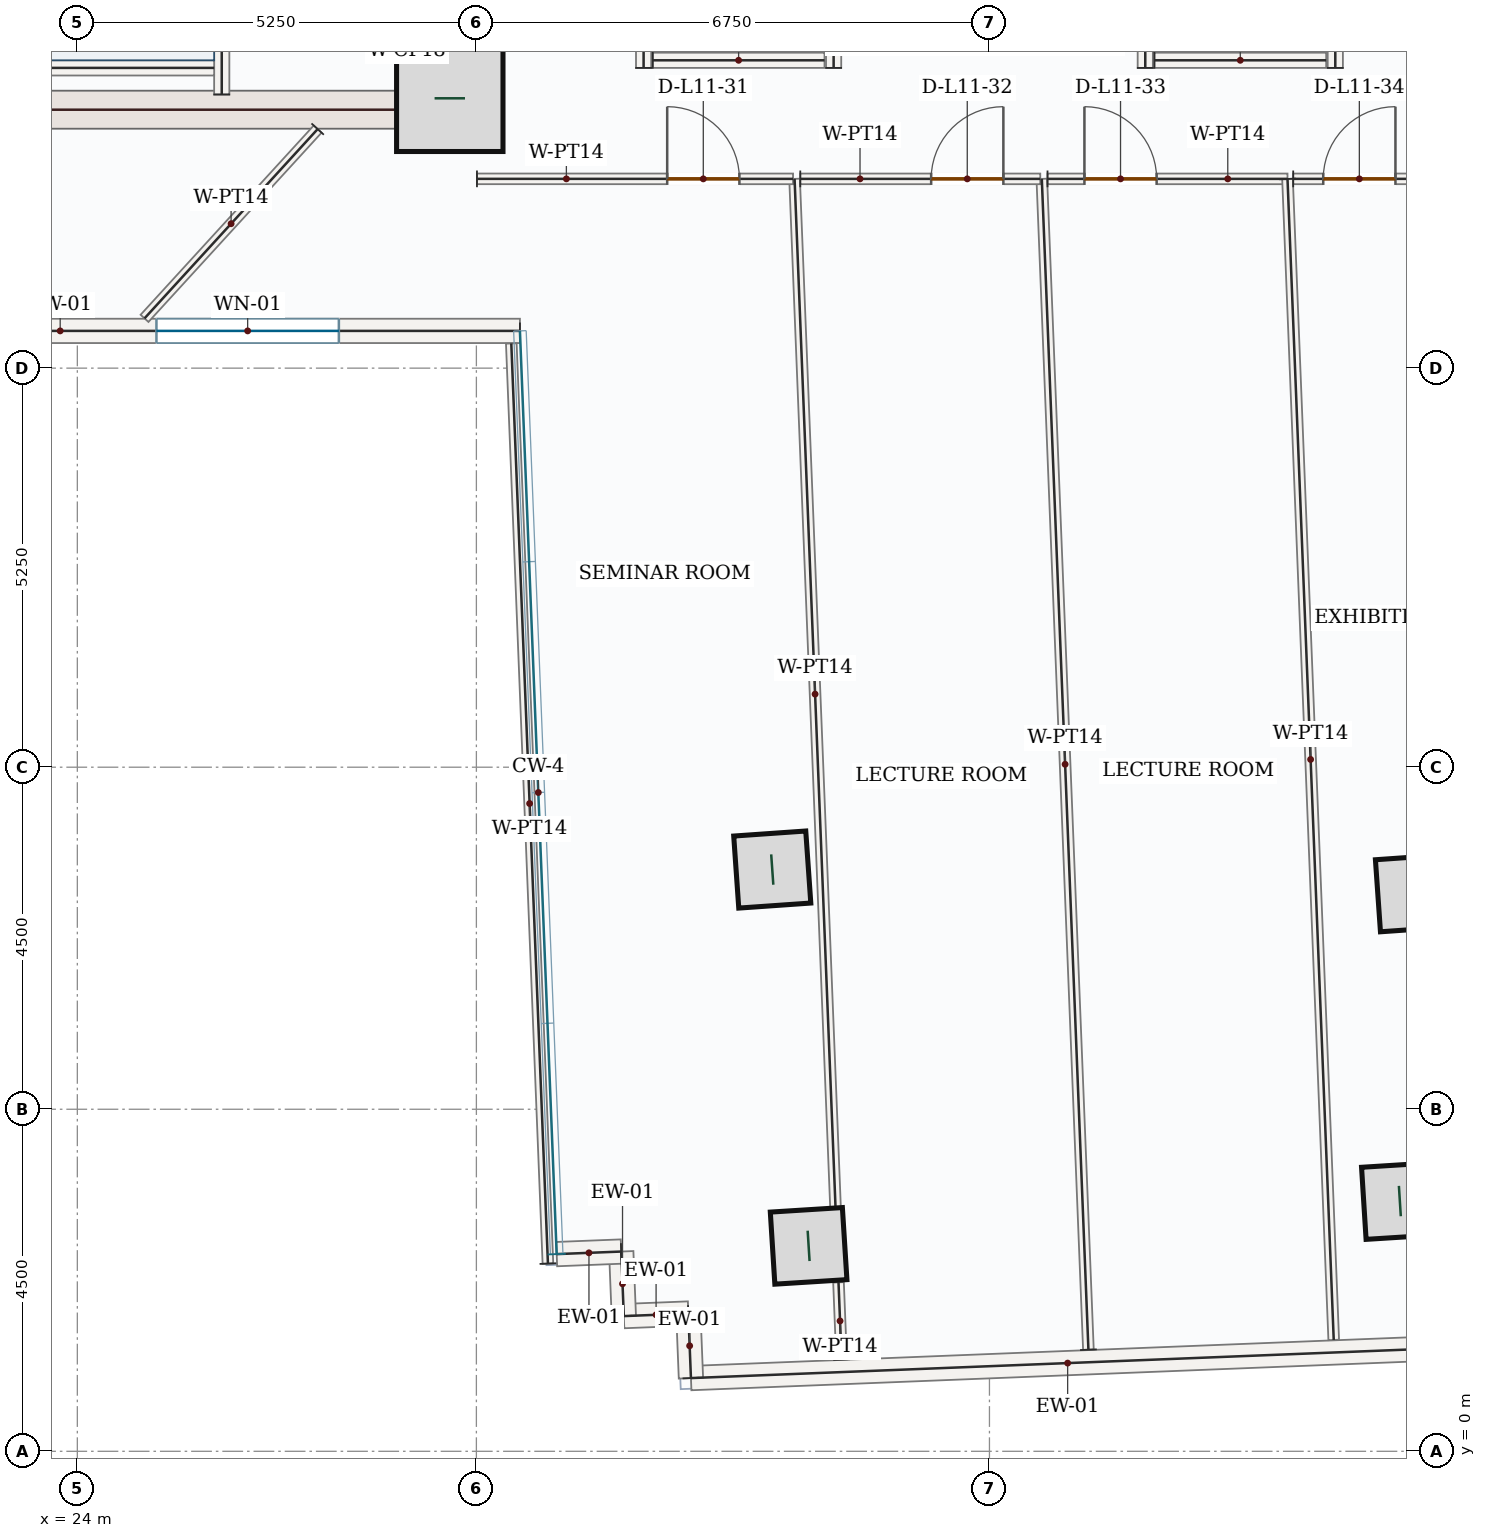
"""IFC4 building model, lengths in metres.
Left out: names, types, materials, properties, quantities, classifications, styles, units other than length and angle.
Written with IfcOpenShell. Run it as: python <this file> out.ifc"""

import sys

from ifc_helpers import new_model, si_unit, direction, frame, frame_2d, origin, origin_2d, place, context, subcontext, project, spatial, rectangle, hollow_rectangle, extrude, source, transform, mapped, element, fill, save


model = new_model("IFC4")
c1 = context("Model", 3, precision=1e-05, world=origin(), true_north=direction((0.0, 1.0)))
c2 = subcontext(c1, "Body", "Model", "MODEL_VIEW")
j1 = project(units=[si_unit("LENGTHUNIT", "METRE"), si_unit("PLANEANGLEUNIT", "RADIAN")], contexts=[c1])
p1 = place(None, origin())
s1 = spatial("IfcSite", under=j1, at=p1, CompositionType="ELEMENT")
p2 = place(p1, origin())
s2 = spatial("IfcBuilding", under=s1, at=p2, CompositionType="ELEMENT")
p3 = place(p2, frame((0.0, 0.0, 54.3)))
s3 = spatial("IfcBuildingStorey", under=s2, at=p3, CompositionType="ELEMENT", Elevation=54.3)
p4 = place(p3, frame((29.0, 17.4, 0.0), z_axis=(0.0, 0.0, 1.0), x_axis=(0.0, 1.0, 0.0)))
e1 = element("IfcWall", 1, at=p4, inside=s3, PredefinedType="SHEAR", context=c2, shape_type="SweptSolid", body=[
    extrude(rectangle(XDim=8.55, YDim=0.5, at=frame_2d((4.275, 0.0))), origin(), (0.0, 0.0, 1.0), 3.95),
])
p5 = place(p4, frame((6.65, 0.0, 0.0)))
e2 = element("IfcOpeningElement", 2, at=p5, cuts=e1, PredefinedType="OPENING", context=c2, shape_type="SweptSolid", body=[
    extrude(rectangle(XDim=1.1, YDim=2.2, at=frame_2d((0.55, 1.1))), frame((0.0, 0.26, 0.0), z_axis=(0.0, -1.0, 0.0), x_axis=(1.0, 0.0, 0.0)), (0.0, 0.0, 1.0), 0.52),
])
p6 = place(p4, frame((2.7, 0.0, 0.0)))
e3 = element("IfcOpeningElement", 3, at=p6, cuts=e1, PredefinedType="OPENING", context=c2, shape_type="SweptSolid", body=[
    extrude(rectangle(XDim=0.88, YDim=2.1, at=frame_2d((0.44, 1.05))), frame((0.0, 0.26, 0.0), z_axis=(0.0, -1.0, 0.0), x_axis=(1.0, 0.0, 0.0)), (0.0, 0.0, 1.0), 0.52),
])
p7 = place(p4, frame((4.6, 0.0, 0.0)))
e4 = element("IfcOpeningElement", 4, at=p7, cuts=e1, PredefinedType="OPENING", context=c2, shape_type="SweptSolid", body=[
    extrude(rectangle(XDim=0.88, YDim=2.1, at=frame_2d((0.44, 1.05))), frame((0.0, 0.26, 0.0), z_axis=(0.0, -1.0, 0.0), x_axis=(1.0, 0.0, 0.0)), (0.0, 0.0, 1.0), 0.52),
])
m1 = source(origin(), c2, "Body", "SweptSolid", [
    extrude(rectangle(XDim=7.0, YDim=0.5, at=frame_2d((3.5, 0.0))), origin(), (0.0, 0.0, 1.0), 3.95),
])
p8 = place(p3, frame((21.75, 17.65, 0.0), z_axis=(0.0, 0.0, 1.0), x_axis=(1.0, 0.0, 0.0)))
e5 = element("IfcWall", 5, at=p8, inside=s3, PredefinedType="SHEAR", context=c2, shape_type="MappedRepresentation", body=[
    mapped(m1, transform((0.0, 0.0, 0.0), x_axis=(1.0, 0.0, 0.0), y_axis=(0.0, 1.0, 0.0), z_axis=(0.0, 0.0, 1.0), scale=1.0)),
])
m2 = source(origin(), c2, "Body", "SweptSolid", [
    extrude(rectangle(XDim=1.4, YDim=1.4, at=origin_2d()), origin(), (0.0, 0.0, 1.0), 4.2),
])
p9 = place(p3, frame((28.9, 17.8, 0.0), z_axis=(0.0, 0.0, 1.0), x_axis=(1.0, 0.0, 0.0)))
e6 = element("IfcColumn", 6, at=p9, inside=s3, PredefinedType="COLUMN", context=c2, shape_type="MappedRepresentation", body=[
    mapped(m2, transform((0.0, 0.0, 0.0), x_axis=(1.0, 0.0, 0.0), y_axis=(0.0, 1.0, 0.0), z_axis=(0.0, 0.0, 1.0), scale=1.0)),
])
m3 = source(origin(), c2, "Body", "SweptSolid", [
    extrude(hollow_rectangle(XDim=0.95, YDim=0.95, WallThickness=0.05, at=origin_2d()), origin(), (0.0, 0.0, 1.0), 4.2),
])
for number, where, z_axis, x_axis in (
    (7, (33.143, 7.654, 0.0), (0.0, 0.0, 1.0), (-0.07, 0.998, 0.0)),
    (8, (41.585, 7.342, 0.0), (0.0, 0.0, 1.0), (-0.07, 0.998, 0.0)),
    (9, (33.621, 2.703, 0.0), (0.0, 0.0, 1.0), (-0.063, 0.998, 0.0)),
    (10, (41.399, 3.292, 0.0), (0.0, 0.0, 1.0), (-0.063, 0.998, 0.0)),
):
    element("IfcColumn", number, at=place(p3, frame(where, z_axis=z_axis, x_axis=x_axis)), inside=s3, PredefinedType="COLUMN", context=c2, shape_type="MappedRepresentation", body=[
        mapped(m3, transform((0.0, 0.0, 0.0), x_axis=(1.0, 0.0, 0.0), y_axis=(0.0, 1.0, 0.0), z_axis=(0.0, 0.0, 1.0), scale=1.0)),
    ])
m4 = source(origin(), c2, "Body", "SweptSolid", [
    extrude(rectangle(XDim=9.92, YDim=0.32, at=frame_2d((4.96, 0.0))), origin(), (0.0, 0.0, 1.0), 3.95),
])
p10 = place(p3, frame((41.985, 1.358, 0.0), z_axis=(0.0, 0.0, 1.0), x_axis=(-0.999207823998, -0.039796035749, 0.0)))
e11 = element("IfcWall", 11, at=p10, inside=s3, PredefinedType="SOLIDWALL", context=c2, shape_type="MappedRepresentation", body=[
    mapped(m4, transform((0.0, 0.0, 0.0), x_axis=(1.0, 0.0, 0.0), y_axis=(0.0, 1.0, 0.0), z_axis=(0.0, 0.0, 1.0), scale=1.0)),
])
m5 = source(origin(), c2, "Body", "SweptSolid", [
    extrude(rectangle(XDim=0.85, YDim=0.32, at=frame_2d((0.425, 0.0))), origin(), (0.0, 0.0, 1.0), 3.95),
])
p11 = place(p3, frame((32.073, 0.963, 0.0), z_axis=(0.0, 0.0, 1.0), x_axis=(-0.039922158152, 0.999202792875, 0.0)))
e12 = element("IfcWall", 12, at=p11, inside=s3, PredefinedType="SOLIDWALL", context=c2, shape_type="MappedRepresentation", body=[
    mapped(m5, transform((0.0, 0.0, 0.0), x_axis=(1.0, 0.0, 0.0), y_axis=(0.0, 1.0, 0.0), z_axis=(0.0, 0.0, 1.0), scale=1.0)),
])
m6 = source(origin(), c2, "Body", "SweptSolid", [
    extrude(rectangle(XDim=0.85, YDim=0.32, at=frame_2d((0.425, 0.0))), origin(), (0.0, 0.0, 1.0), 3.95),
])
for number, where, z_axis, x_axis in (
    (13, (32.039, 1.812, 0.0), (0.0, 0.0, 1.0), (-0.999, -0.04, 0.0)),
    (14, (31.19, 1.779, 0.0), (0.0, 0.0, 1.0), (-0.04, 0.999, 0.0)),
):
    element("IfcWall", number, at=place(p3, frame(where, z_axis=z_axis, x_axis=x_axis)), inside=s3, PredefinedType="SOLIDWALL", context=c2, shape_type="MappedRepresentation", body=[
        mapped(m6, transform((0.0, 0.0, 0.0), x_axis=(1.0, 0.0, 0.0), y_axis=(0.0, 1.0, 0.0), z_axis=(0.0, 0.0, 1.0), scale=1.0)),
    ])
p12 = place(p3, frame((31.156, 2.628, 0.0), z_axis=(0.0, 0.0, 1.0), x_axis=(-0.999214208752, -0.039635401209, 0.0)))
e15 = element("IfcWall", 15, at=p12, inside=s3, PredefinedType="SOLIDWALL", context=c2, shape_type="MappedRepresentation", body=[
    mapped(m5, transform((0.0, 0.0, 0.0), x_axis=(1.0, 0.0, 0.0), y_axis=(0.0, 1.0, 0.0), z_axis=(0.0, 0.0, 1.0), scale=1.0)),
])
p13 = place(p3, frame((29.823, 14.74, 0.0), z_axis=(0.0, 0.0, 1.0), x_axis=(-1.0, 0.0, 0.0)))
e16 = element("IfcWall", 16, at=p13, inside=s3, PredefinedType="SOLIDWALL", context=c2, shape_type="SweptSolid", body=[
    extrude(rectangle(XDim=7.165, YDim=0.32, at=frame_2d((3.583, 0.0))), origin(), (0.0, 0.0, 1.0), 3.95),
])
p14 = place(p13, frame((2.382, 0.0, 0.85)))
e17 = element("IfcOpeningElement", 17, at=p14, cuts=e16, PredefinedType="OPENING", context=c2, shape_type="SweptSolid", body=[
    extrude(rectangle(XDim=2.4, YDim=1.8, at=frame_2d((1.2, 0.9))), frame((0.0, 0.17, 0.0), z_axis=(0.0, -1.0, 0.0), x_axis=(1.0, 0.0, 0.0)), (0.0, 0.0, 1.0), 0.34),
])
p15 = place(p3, frame((25.9, 17.85, 0.0), z_axis=(0.0, 0.0, 1.0), x_axis=(0.0, 1.0, 0.0)))
e18 = element("IfcWall", 18, at=p15, inside=s3, PredefinedType="SOLIDWALL", context=c2, shape_type="SweptSolid", body=[
    extrude(rectangle(XDim=8.0, YDim=0.2, at=frame_2d((4.0, 0.0))), origin(), (0.0, 0.0, 1.0), 3.95),
])
p16 = place(p15, frame((6.3, 0.0, 0.0)))
e19 = element("IfcOpeningElement", 19, at=p16, cuts=e18, PredefinedType="OPENING", context=c2, shape_type="SweptSolid", body=[
    extrude(rectangle(XDim=1.05, YDim=2.15, at=frame_2d((0.525, 1.075))), frame((0.0, 0.11, 0.0), z_axis=(0.0, -1.0, 0.0), x_axis=(1.0, 0.0, 0.0)), (0.0, 0.0, 1.0), 0.22),
])
m7 = source(origin(), c2, "Body", "SweptSolid", [
    extrude(rectangle(XDim=3.25, YDim=0.2, at=frame_2d((1.625, 0.0))), origin(), (0.0, 0.0, 1.0), 3.95),
])
p17 = place(p3, frame((22.55, 18.2, 0.0), z_axis=(0.0, 0.0, 1.0), x_axis=(1.0, 0.0, 0.0)))
e20 = element("IfcWall", 20, at=p17, inside=s3, PredefinedType="SOLIDWALL", context=c2, shape_type="MappedRepresentation", body=[
    mapped(m7, transform((0.0, 0.0, 0.0), x_axis=(1.0, 0.0, 0.0), y_axis=(0.0, 1.0, 0.0), z_axis=(0.0, 0.0, 1.0), scale=1.0)),
])
m8 = source(origin(), c2, "Body", "SweptSolid", [
    extrude(rectangle(XDim=2.35, YDim=0.2, at=frame_2d((1.175, 0.0))), origin(), (0.0, 0.0, 1.0), 3.95),
])
for number, where, z_axis, x_axis in (
    (21, (31.45, 18.2, 0.0), (0.0, 0.0, 1.0), (0.0, 1.0, 0.0)),
    (22, (33.95, 18.2, 0.0), (0.0, 0.0, 1.0), (0.0, 1.0, 0.0)),
):
    element("IfcWall", number, at=place(p3, frame(where, z_axis=z_axis, x_axis=x_axis)), inside=s3, PredefinedType="SOLIDWALL", context=c2, shape_type="MappedRepresentation", body=[
        mapped(m8, transform((0.0, 0.0, 0.0), x_axis=(1.0, 0.0, 0.0), y_axis=(0.0, 1.0, 0.0), z_axis=(0.0, 0.0, 1.0), scale=1.0)),
    ])
m9 = source(origin(), c2, "Body", "SweptSolid", [
    extrude(rectangle(XDim=2.26, YDim=0.2, at=frame_2d((1.13, 0.0))), origin(), (0.0, 0.0, 1.0), 3.95),
])
p18 = place(p3, frame((31.57, 18.3, 0.0), z_axis=(0.0, 0.0, 1.0), x_axis=(1.0, 0.0, 0.0)))
e23 = element("IfcWall", 23, at=p18, inside=s3, PredefinedType="SOLIDWALL", context=c2, shape_type="MappedRepresentation", body=[
    mapped(m9, transform((0.0, 0.0, 0.0), x_axis=(1.0, 0.0, 0.0), y_axis=(0.0, 1.0, 0.0), z_axis=(0.0, 0.0, 1.0), scale=1.0)),
])
for number, where, z_axis, x_axis in (
    (24, (38.05, 18.2, 0.0), (0.0, 0.0, 1.0), (0.0, 1.0, 0.0)),
    (25, (40.55, 18.2, 0.0), (0.0, 0.0, 1.0), (0.0, 1.0, 0.0)),
):
    element("IfcWall", number, at=place(p3, frame(where, z_axis=z_axis, x_axis=x_axis)), inside=s3, PredefinedType="SOLIDWALL", context=c2, shape_type="MappedRepresentation", body=[
        mapped(m8, transform((0.0, 0.0, 0.0), x_axis=(1.0, 0.0, 0.0), y_axis=(0.0, 1.0, 0.0), z_axis=(0.0, 0.0, 1.0), scale=1.0)),
    ])
p19 = place(p3, frame((38.17, 18.3, 0.0), z_axis=(0.0, 0.0, 1.0), x_axis=(1.0, 0.0, 0.0)))
e26 = element("IfcWall", 26, at=p19, inside=s3, PredefinedType="SOLIDWALL", context=c2, shape_type="MappedRepresentation", body=[
    mapped(m9, transform((0.0, 0.0, 0.0), x_axis=(1.0, 0.0, 0.0), y_axis=(0.0, 1.0, 0.0), z_axis=(0.0, 0.0, 1.0), scale=1.0)),
])
m10 = source(origin(), c2, "Body", "SweptSolid", [
    extrude(rectangle(XDim=15.416, YDim=0.14, at=frame_2d((7.708, 0.0))), origin(), (0.0, 0.0, 1.0), 3.95),
])
p20 = place(p3, frame((37.302, 1.336, 0.0), z_axis=(0.0, 0.0, 1.0), x_axis=(-0.039782723686, 0.999208354096, 0.0)))
e27 = element("IfcWall", 27, at=p20, inside=s3, PredefinedType="PARTITIONING", context=c2, shape_type="MappedRepresentation", body=[
    mapped(m10, transform((0.0, 0.0, 0.0), x_axis=(1.0, 0.0, 0.0), y_axis=(0.0, 1.0, 0.0), z_axis=(0.0, 0.0, 1.0), scale=1.0)),
])
p21 = place(p3, frame((36.764, 16.74, 0.0), z_axis=(0.0, 0.0, 1.0), x_axis=(1.0, 0.0, 0.0)))
e28 = element("IfcWall", 28, at=p21, inside=s3, PredefinedType="PARTITIONING", context=c2, shape_type="SweptSolid", body=[
    extrude(rectangle(XDim=3.157, YDim=0.14, at=frame_2d((1.579, 0.0))), origin(), (0.0, 0.0, 1.0), 3.95),
])
p22 = place(p21, frame((0.486, 0.0, 0.0)))
e29 = element("IfcOpeningElement", 29, at=p22, cuts=e28, PredefinedType="OPENING", context=c2, shape_type="SweptSolid", body=[
    extrude(rectangle(XDim=0.95, YDim=2.15, at=frame_2d((0.475, 1.075))), frame((0.0, 0.08, 0.0), z_axis=(0.0, -1.0, 0.0), x_axis=(1.0, 0.0, 0.0)), (0.0, 0.0, 1.0), 0.16),
])
m11 = source(origin(), c2, "Body", "SweptSolid", [
    extrude(rectangle(XDim=15.286, YDim=0.14, at=frame_2d((7.643, 0.0))), origin(), (0.0, 0.0, 1.0), 3.95),
])
p23 = place(p3, frame((39.921, 16.739, 0.0), z_axis=(0.0, 0.0, 1.0), x_axis=(0.039769031662, -0.99920889914, 0.0)))
e30 = element("IfcWall", 30, at=p23, inside=s3, PredefinedType="PARTITIONING", context=c2, shape_type="MappedRepresentation", body=[
    mapped(m11, transform((0.0, 0.0, 0.0), x_axis=(1.0, 0.0, 0.0), y_axis=(0.0, 1.0, 0.0), z_axis=(0.0, 0.0, 1.0), scale=1.0)),
])
m12 = source(origin(), c2, "Body", "SweptSolid", [
    extrude(rectangle(XDim=1.016, YDim=0.14, at=frame_2d((0.508, 0.0))), origin(), (0.0, 0.0, 1.0), 3.95),
])
p24 = place(p3, frame((34.055, 1.207, 0.0), z_axis=(0.0, 0.0, 1.0), x_axis=(-0.03988168596, 0.99920440908, 0.0)))
e31 = element("IfcWall", 31, at=p24, inside=s3, PredefinedType="PARTITIONING", context=c2, shape_type="MappedRepresentation", body=[
    mapped(m12, transform((0.0, 0.0, 0.0), x_axis=(1.0, 0.0, 0.0), y_axis=(0.0, 1.0, 0.0), z_axis=(0.0, 0.0, 1.0), scale=1.0)),
])
m13 = source(origin(), c2, "Body", "SweptSolid", [
    extrude(rectangle(XDim=13.568, YDim=0.14, at=frame_2d((6.784, 0.0))), origin(), (0.0, 0.0, 1.0), 3.95),
])
p25 = place(p3, frame((33.976, 3.183, 0.0), z_axis=(0.0, 0.0, 1.0), x_axis=(-0.039766111253, 0.99920901537, 0.0)))
e32 = element("IfcWall", 32, at=p25, inside=s3, PredefinedType="PARTITIONING", context=c2, shape_type="MappedRepresentation", body=[
    mapped(m13, transform((0.0, 0.0, 0.0), x_axis=(1.0, 0.0, 0.0), y_axis=(0.0, 1.0, 0.0), z_axis=(0.0, 0.0, 1.0), scale=1.0)),
])
p26 = place(p3, frame((33.511, 16.74, 0.0), z_axis=(0.0, 0.0, 1.0), x_axis=(1.0, 0.0, 0.0)))
e33 = element("IfcWall", 33, at=p26, inside=s3, PredefinedType="PARTITIONING", context=c2, shape_type="SweptSolid", body=[
    extrude(rectangle(XDim=3.157, YDim=0.14, at=frame_2d((1.579, 0.0))), origin(), (0.0, 0.0, 1.0), 3.95),
])
p27 = place(p26, frame((1.722, 0.0, 0.0)))
e34 = element("IfcOpeningElement", 34, at=p27, cuts=e33, PredefinedType="OPENING", context=c2, shape_type="SweptSolid", body=[
    extrude(rectangle(XDim=0.95, YDim=2.15, at=frame_2d((0.475, 1.075))), frame((0.0, 0.08, 0.0), z_axis=(0.0, -1.0, 0.0), x_axis=(1.0, 0.0, 0.0)), (0.0, 0.0, 1.0), 0.16),
])
p28 = place(p3, frame((39.996, 16.74, 0.0), z_axis=(0.0, 0.0, 1.0), x_axis=(0.999999996048, 8.8904694e-05, 0.0)))
e35 = element("IfcWall", 35, at=p28, inside=s3, PredefinedType="PARTITIONING", context=c2, shape_type="SweptSolid", body=[
    extrude(rectangle(XDim=2.746, YDim=0.14, at=frame_2d((1.373, 0.0))), origin(), (0.0, 0.0, 1.0), 3.95),
])
p29 = place(p28, frame((0.395, 0.0, 0.0)))
e36 = element("IfcOpeningElement", 36, at=p29, cuts=e35, PredefinedType="OPENING", context=c2, shape_type="SweptSolid", body=[
    extrude(rectangle(XDim=0.95, YDim=2.15, at=frame_2d((0.475, 1.075))), frame((0.0, 0.08, 0.0), z_axis=(0.0, -1.0, 0.0), x_axis=(1.0, 0.0, 0.0)), (0.0, 0.0, 1.0), 0.16),
])
m14 = source(origin(), c2, "Body", "SweptSolid", [
    extrude(rectangle(XDim=3.375, YDim=0.14, at=frame_2d((1.688, 0.0))), origin(), (0.0, 0.0, 1.0), 3.95),
])
p30 = place(p3, frame((27.162, 17.395, 0.0), z_axis=(0.0, 0.0, 1.0), x_axis=(-0.674974079893, -0.737841440604, 0.0)))
e37 = element("IfcWall", 37, at=p30, inside=s3, PredefinedType="PARTITIONING", context=c2, shape_type="MappedRepresentation", body=[
    mapped(m14, transform((0.0, 0.0, 0.0), x_axis=(1.0, 0.0, 0.0), y_axis=(0.0, 1.0, 0.0), z_axis=(0.0, 0.0, 1.0), scale=1.0)),
])
p31 = place(p3, frame((29.258, 16.74, 0.0), z_axis=(0.0, 0.0, 1.0), x_axis=(0.999999998277, -5.8706117e-05, 0.0)))
e38 = element("IfcWall", 38, at=p31, inside=s3, PredefinedType="PARTITIONING", context=c2, shape_type="SweptSolid", body=[
    extrude(rectangle(XDim=4.159, YDim=0.14, at=frame_2d((2.079, 0.0))), origin(), (0.0, 0.0, 1.0), 3.95),
])
p32 = place(p31, frame((2.503, 0.0, 0.0)))
e39 = element("IfcOpeningElement", 39, at=p32, cuts=e38, PredefinedType="OPENING", context=c2, shape_type="SweptSolid", body=[
    extrude(rectangle(XDim=0.95, YDim=2.15, at=frame_2d((0.475, 1.075))), frame((0.0, 0.08, 0.0), z_axis=(0.0, -1.0, 0.0), x_axis=(1.0, 0.0, 0.0)), (0.0, 0.0, 1.0), 0.16),
])
m15 = source(origin(), c2, "Body", "SweptSolid", [
    extrude(rectangle(XDim=12.115, YDim=0.14, at=frame_2d((6.058, 0.0))), origin(), (0.0, 0.0, 1.0), 3.95),
])
p33 = place(p3, frame((30.191, 2.469, 0.0), z_axis=(0.0, 0.0, 1.0), x_axis=(-0.039799837716, 0.999207672568, 0.0)))
e40 = element("IfcWall", 40, at=p33, inside=s3, PredefinedType="PARTITIONING", context=c2, shape_type="MappedRepresentation", body=[
    mapped(m15, transform((0.0, 0.0, 0.0), x_axis=(1.0, 0.0, 0.0), y_axis=(0.0, 1.0, 0.0), z_axis=(0.0, 0.0, 1.0), scale=1.0)),
])
m16 = source(origin(), c2, "Body", "SweptSolid", [
    extrude(rectangle(XDim=2.4, YDim=1.8, at=frame_2d((1.2, 0.9))), frame((0.0, 0.03, 0.0), z_axis=(0.0, -1.0, 0.0), x_axis=(1.0, 0.0, 0.0)), (0.0, 0.0, 1.0), 0.06),
])
p34 = place(p14, origin())
e41 = element("IfcWindow", 41, at=p34, inside=s3, PartitioningType="DOUBLE_PANEL_VERTICAL", PredefinedType="WINDOW", context=c2, shape_type="MappedRepresentation", body=[
    mapped(m16, transform((0.0, 0.0, 0.0), x_axis=(1.0, 0.0, 0.0), y_axis=(0.0, 1.0, 0.0), z_axis=(0.0, 0.0, 1.0), scale=1.0)),
])
fill(e17, e41)
m17 = source(origin(), c2, "Body", "SweptSolid", [
    extrude(rectangle(XDim=0.95, YDim=2.15, at=frame_2d((0.475, 1.075))), frame((0.0, 0.025, 0.0), z_axis=(0.0, -1.0, 0.0), x_axis=(1.0, 0.0, 0.0)), (0.0, 0.0, 1.0), 0.05),
])
p35 = place(p32, origin())
e42 = element("IfcDoor", 42, at=p35, inside=s3, OperationType="SINGLE_SWING_LEFT", PredefinedType="DOOR", context=c2, shape_type="MappedRepresentation", body=[
    mapped(m17, transform((0.0, 0.0, 0.0), x_axis=(1.0, 0.0, 0.0), y_axis=(0.0, 1.0, 0.0), z_axis=(0.0, 0.0, 1.0), scale=1.0)),
])
fill(e39, e42)
p36 = place(p27, origin())
e43 = element("IfcDoor", 43, at=p36, inside=s3, OperationType="SINGLE_SWING_RIGHT", PredefinedType="DOOR", context=c2, shape_type="MappedRepresentation", body=[
    mapped(m17, transform((0.0, 0.0, 0.0), x_axis=(1.0, 0.0, 0.0), y_axis=(0.0, 1.0, 0.0), z_axis=(0.0, 0.0, 1.0), scale=1.0)),
])
fill(e34, e43)
p37 = place(p22, origin())
e44 = element("IfcDoor", 44, at=p37, inside=s3, OperationType="SINGLE_SWING_LEFT", PredefinedType="DOOR", context=c2, shape_type="MappedRepresentation", body=[
    mapped(m17, transform((0.0, 0.0, 0.0), x_axis=(1.0, 0.0, 0.0), y_axis=(0.0, 1.0, 0.0), z_axis=(0.0, 0.0, 1.0), scale=1.0)),
])
fill(e29, e44)
p38 = place(p29, origin())
e45 = element("IfcDoor", 45, at=p38, inside=s3, OperationType="SINGLE_SWING_RIGHT", PredefinedType="DOOR", context=c2, shape_type="MappedRepresentation", body=[
    mapped(m17, transform((0.0, 0.0, 0.0), x_axis=(1.0, 0.0, 0.0), y_axis=(0.0, 1.0, 0.0), z_axis=(0.0, 0.0, 1.0), scale=1.0)),
])
fill(e36, e45)
save(model, sys.argv[1])
